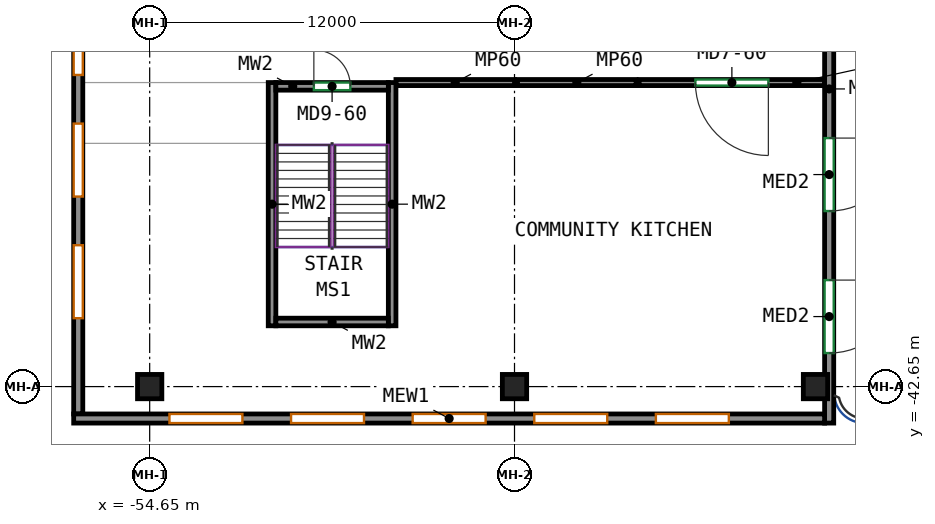
"""IFC4 building model, lengths in metres.
Left out: names, types, materials, properties, quantities, classifications, styles, units other than length and angle.
Written with IfcOpenShell. Run it as: python <this file> out.ifc"""

import sys

from ifc_helpers import new_model, si_unit, direction, frame, frame_2d, origin, origin_2d, place, context, subcontext, project, spatial, rectangle, extrude, source, transform, mapped, element, fill, save


model = new_model("IFC4")
c1 = context("Model", 3, precision=1e-05, world=origin(), true_north=direction((0.0, 1.0)))
c2 = subcontext(c1, "Body", "Model", "MODEL_VIEW")
j1 = project(units=[si_unit("LENGTHUNIT", "METRE"), si_unit("PLANEANGLEUNIT", "RADIAN")], contexts=[c1])
p1 = place(None, origin())
s1 = spatial("IfcSite", under=j1, at=p1, CompositionType="ELEMENT")
p2 = place(p1, origin())
s2 = spatial("IfcBuilding", under=s1, at=p2, CompositionType="ELEMENT")
p3 = place(p2, frame((0.0, 0.0, 13.5)))
s3 = spatial("IfcBuildingStorey", under=s2, at=p3, CompositionType="ELEMENT", Elevation=13.5)
m1 = source(origin(), c2, "Body", "SweptSolid", [
    extrude(rectangle(XDim=0.8, YDim=0.8, at=origin_2d()), origin(), (0.0, 0.0, 1.0), 4.1),
])
for number, where, z_axis, x_axis in (
    (1, (-54.65, -42.65, 0.0), (0.0, 0.0, 1.0), (1.0, 0.0, 0.0)),
    (2, (-42.65, -42.65, 0.0), (0.0, 0.0, 1.0), (1.0, 0.0, 0.0)),
    (3, (-32.75, -42.65, 0.0), (0.0, 0.0, 1.0), (1.0, 0.0, 0.0)),
):
    element("IfcColumn", number, at=place(p3, frame(where, z_axis=z_axis, x_axis=x_axis)), inside=s3, PredefinedType="COLUMN", context=c2, shape_type="MappedRepresentation", body=[
        mapped(m1, transform((0.0, 0.0, 0.0))),
    ])
m2 = source(origin(), c2, "Body", "SweptSolid", [
    extrude(rectangle(XDim=8.0, YDim=0.25, at=frame_2d((4.0, 0.0))), origin(), (0.0, 0.0, 1.0), 4.1),
])
for number, where, z_axis, x_axis in (
    (4, (-50.625, -40.65, 0.0), (0.0, 0.0, 1.0), (0.0, 1.0, 0.0)),
    (5, (-46.675, -40.65, 0.0), (0.0, 0.0, 1.0), (0.0, 1.0, 0.0)),
):
    element("IfcWall", number, at=place(p3, frame(where, z_axis=z_axis, x_axis=x_axis)), inside=s3, PredefinedType="SHEAR", context=c2, shape_type="MappedRepresentation", body=[
        mapped(m2, transform((0.0, 0.0, 0.0))),
    ])
m3 = source(origin(), c2, "Body", "SweptSolid", [
    extrude(rectangle(XDim=3.7, YDim=0.25, at=frame_2d((1.85, 0.0))), origin(), (0.0, 0.0, 1.0), 4.1),
])
p4 = place(p3, frame((-50.5, -40.525, 0.0), z_axis=(0.0, 0.0, 1.0), x_axis=(1.0, 0.0, 0.0)))
e6 = element("IfcWall", 6, at=p4, inside=s3, PredefinedType="SHEAR", context=c2, shape_type="MappedRepresentation", body=[
    mapped(m3, transform((0.0, 0.0, 0.0))),
])
p5 = place(p3, frame((-50.5, -32.775, 0.0), z_axis=(0.0, 0.0, 1.0), x_axis=(1.0, 0.0, 0.0)))
e7 = element("IfcWall", 7, at=p5, inside=s3, PredefinedType="SHEAR", context=c2, shape_type="MappedRepresentation", body=[
    mapped(m3, transform((0.0, 0.0, 0.0))),
])
p6 = place(p5, frame((1.25, 0.0, 0.0)))
e8 = element("IfcOpeningElement", 8, at=p6, cuts=e7, PredefinedType="OPENING", context=c2, shape_type="SweptSolid", body=[
    extrude(rectangle(XDim=1.2, YDim=2.1, at=frame_2d((0.6, 1.05))), frame((0.0, 0.135, 0.0), z_axis=(0.0, -1.0, 0.0), x_axis=(1.0, 0.0, 0.0)), (0.0, 0.0, 1.0), 0.27),
])
m4 = source(origin(), c2, "Body", "SweptSolid", [
    extrude(rectangle(XDim=100.7, YDim=0.3, at=frame_2d((50.35, 0.0))), origin(), (0.0, 0.0, 1.0), 4.1),
])
p7 = place(p3, frame((-57.0, -43.55, 0.0), z_axis=(0.0, 0.0, 1.0), x_axis=(0.0, 1.0, 0.0)))
e9 = element("IfcWall", 9, at=p7, inside=s3, PredefinedType="SOLIDWALL", context=c2, shape_type="MappedRepresentation", body=[
    mapped(m4, transform((0.0, 0.0, 0.0))),
])
p8 = place(p7, frame((3.15, 0.0, 0.9)))
e10 = element("IfcOpeningElement", 10, at=p8, cuts=e9, PredefinedType="OPENING", context=c2, shape_type="SweptSolid", body=[
    extrude(rectangle(XDim=2.4, YDim=1.8, at=frame_2d((1.2, 0.9))), frame((0.0, 0.16, 0.0), z_axis=(0.0, -1.0, 0.0), x_axis=(1.0, 0.0, 0.0)), (0.0, 0.0, 1.0), 0.32),
])
p9 = place(p7, frame((7.15, 0.0, 0.9)))
e11 = element("IfcOpeningElement", 11, at=p9, cuts=e9, PredefinedType="OPENING", context=c2, shape_type="SweptSolid", body=[
    extrude(rectangle(XDim=2.4, YDim=1.8, at=frame_2d((1.2, 0.9))), frame((0.0, 0.16, 0.0), z_axis=(0.0, -1.0, 0.0), x_axis=(1.0, 0.0, 0.0)), (0.0, 0.0, 1.0), 0.32),
])
p10 = place(p7, frame((11.15, 0.0, 0.9)))
e12 = element("IfcOpeningElement", 12, at=p10, cuts=e9, PredefinedType="OPENING", context=c2, shape_type="SweptSolid", body=[
    extrude(rectangle(XDim=2.4, YDim=1.8, at=frame_2d((1.2, 0.9))), frame((0.0, 0.16, 0.0), z_axis=(0.0, -1.0, 0.0), x_axis=(1.0, 0.0, 0.0)), (0.0, 0.0, 1.0), 0.32),
])
p11 = place(p7, frame((19.15, 0.0, 0.9)))
e13 = element("IfcOpeningElement", 13, at=p11, cuts=e9, PredefinedType="OPENING", context=c2, shape_type="SweptSolid", body=[
    extrude(rectangle(XDim=2.4, YDim=1.8, at=frame_2d((1.2, 0.9))), frame((0.0, 0.16, 0.0), z_axis=(0.0, -1.0, 0.0), x_axis=(1.0, 0.0, 0.0)), (0.0, 0.0, 1.0), 0.32),
])
p12 = place(p7, frame((23.15, 0.0, 0.9)))
e14 = element("IfcOpeningElement", 14, at=p12, cuts=e9, PredefinedType="OPENING", context=c2, shape_type="SweptSolid", body=[
    extrude(rectangle(XDim=2.4, YDim=1.8, at=frame_2d((1.2, 0.9))), frame((0.0, 0.16, 0.0), z_axis=(0.0, -1.0, 0.0), x_axis=(1.0, 0.0, 0.0)), (0.0, 0.0, 1.0), 0.32),
])
p13 = place(p7, frame((27.15, 0.0, 0.9)))
e15 = element("IfcOpeningElement", 15, at=p13, cuts=e9, PredefinedType="OPENING", context=c2, shape_type="SweptSolid", body=[
    extrude(rectangle(XDim=2.4, YDim=1.8, at=frame_2d((1.2, 0.9))), frame((0.0, 0.16, 0.0), z_axis=(0.0, -1.0, 0.0), x_axis=(1.0, 0.0, 0.0)), (0.0, 0.0, 1.0), 0.32),
])
p14 = place(p7, frame((31.15, 0.0, 0.9)))
e16 = element("IfcOpeningElement", 16, at=p14, cuts=e9, PredefinedType="OPENING", context=c2, shape_type="SweptSolid", body=[
    extrude(rectangle(XDim=2.4, YDim=1.8, at=frame_2d((1.2, 0.9))), frame((0.0, 0.16, 0.0), z_axis=(0.0, -1.0, 0.0), x_axis=(1.0, 0.0, 0.0)), (0.0, 0.0, 1.0), 0.32),
])
p15 = place(p7, frame((39.15, 0.0, 0.9)))
e17 = element("IfcOpeningElement", 17, at=p15, cuts=e9, PredefinedType="OPENING", context=c2, shape_type="SweptSolid", body=[
    extrude(rectangle(XDim=2.4, YDim=1.8, at=frame_2d((1.2, 0.9))), frame((0.0, 0.16, 0.0), z_axis=(0.0, -1.0, 0.0), x_axis=(1.0, 0.0, 0.0)), (0.0, 0.0, 1.0), 0.32),
])
p16 = place(p7, frame((43.15, 0.0, 0.9)))
e18 = element("IfcOpeningElement", 18, at=p16, cuts=e9, PredefinedType="OPENING", context=c2, shape_type="SweptSolid", body=[
    extrude(rectangle(XDim=2.4, YDim=1.8, at=frame_2d((1.2, 0.9))), frame((0.0, 0.16, 0.0), z_axis=(0.0, -1.0, 0.0), x_axis=(1.0, 0.0, 0.0)), (0.0, 0.0, 1.0), 0.32),
])
p17 = place(p7, frame((51.15, 0.0, 0.9)))
e19 = element("IfcOpeningElement", 19, at=p17, cuts=e9, PredefinedType="OPENING", context=c2, shape_type="SweptSolid", body=[
    extrude(rectangle(XDim=2.4, YDim=1.8, at=frame_2d((1.2, 0.9))), frame((0.0, 0.16, 0.0), z_axis=(0.0, -1.0, 0.0), x_axis=(1.0, 0.0, 0.0)), (0.0, 0.0, 1.0), 0.32),
])
p18 = place(p7, frame((55.15, 0.0, 0.9)))
e20 = element("IfcOpeningElement", 20, at=p18, cuts=e9, PredefinedType="OPENING", context=c2, shape_type="SweptSolid", body=[
    extrude(rectangle(XDim=2.4, YDim=1.8, at=frame_2d((1.2, 0.9))), frame((0.0, 0.16, 0.0), z_axis=(0.0, -1.0, 0.0), x_axis=(1.0, 0.0, 0.0)), (0.0, 0.0, 1.0), 0.32),
])
p19 = place(p7, frame((59.15, 0.0, 0.9)))
e21 = element("IfcOpeningElement", 21, at=p19, cuts=e9, PredefinedType="OPENING", context=c2, shape_type="SweptSolid", body=[
    extrude(rectangle(XDim=2.4, YDim=1.8, at=frame_2d((1.2, 0.9))), frame((0.0, 0.16, 0.0), z_axis=(0.0, -1.0, 0.0), x_axis=(1.0, 0.0, 0.0)), (0.0, 0.0, 1.0), 0.32),
])
p20 = place(p7, frame((63.15, 0.0, 0.9)))
e22 = element("IfcOpeningElement", 22, at=p20, cuts=e9, PredefinedType="OPENING", context=c2, shape_type="SweptSolid", body=[
    extrude(rectangle(XDim=2.4, YDim=1.8, at=frame_2d((1.2, 0.9))), frame((0.0, 0.16, 0.0), z_axis=(0.0, -1.0, 0.0), x_axis=(1.0, 0.0, 0.0)), (0.0, 0.0, 1.0), 0.32),
])
p21 = place(p7, frame((67.15, 0.0, 0.9)))
e23 = element("IfcOpeningElement", 23, at=p21, cuts=e9, PredefinedType="OPENING", context=c2, shape_type="SweptSolid", body=[
    extrude(rectangle(XDim=2.4, YDim=1.8, at=frame_2d((1.2, 0.9))), frame((0.0, 0.16, 0.0), z_axis=(0.0, -1.0, 0.0), x_axis=(1.0, 0.0, 0.0)), (0.0, 0.0, 1.0), 0.32),
])
p22 = place(p7, frame((75.15, 0.0, 0.9)))
e24 = element("IfcOpeningElement", 24, at=p22, cuts=e9, PredefinedType="OPENING", context=c2, shape_type="SweptSolid", body=[
    extrude(rectangle(XDim=2.4, YDim=1.8, at=frame_2d((1.2, 0.9))), frame((0.0, 0.16, 0.0), z_axis=(0.0, -1.0, 0.0), x_axis=(1.0, 0.0, 0.0)), (0.0, 0.0, 1.0), 0.32),
])
p23 = place(p7, frame((79.15, 0.0, 0.9)))
e25 = element("IfcOpeningElement", 25, at=p23, cuts=e9, PredefinedType="OPENING", context=c2, shape_type="SweptSolid", body=[
    extrude(rectangle(XDim=2.4, YDim=1.8, at=frame_2d((1.2, 0.9))), frame((0.0, 0.16, 0.0), z_axis=(0.0, -1.0, 0.0), x_axis=(1.0, 0.0, 0.0)), (0.0, 0.0, 1.0), 0.32),
])
p24 = place(p7, frame((83.15, 0.0, 0.9)))
e26 = element("IfcOpeningElement", 26, at=p24, cuts=e9, PredefinedType="OPENING", context=c2, shape_type="SweptSolid", body=[
    extrude(rectangle(XDim=2.4, YDim=1.8, at=frame_2d((1.2, 0.9))), frame((0.0, 0.16, 0.0), z_axis=(0.0, -1.0, 0.0), x_axis=(1.0, 0.0, 0.0)), (0.0, 0.0, 1.0), 0.32),
])
p25 = place(p7, frame((87.15, 0.0, 0.9)))
e27 = element("IfcOpeningElement", 27, at=p25, cuts=e9, PredefinedType="OPENING", context=c2, shape_type="SweptSolid", body=[
    extrude(rectangle(XDim=2.4, YDim=1.8, at=frame_2d((1.2, 0.9))), frame((0.0, 0.16, 0.0), z_axis=(0.0, -1.0, 0.0), x_axis=(1.0, 0.0, 0.0)), (0.0, 0.0, 1.0), 0.32),
])
p26 = place(p7, frame((91.15, 0.0, 0.9)))
e28 = element("IfcOpeningElement", 28, at=p26, cuts=e9, PredefinedType="OPENING", context=c2, shape_type="SweptSolid", body=[
    extrude(rectangle(XDim=2.4, YDim=1.8, at=frame_2d((1.2, 0.9))), frame((0.0, 0.16, 0.0), z_axis=(0.0, -1.0, 0.0), x_axis=(1.0, 0.0, 0.0)), (0.0, 0.0, 1.0), 0.32),
])
p27 = place(p7, frame((95.15, 0.0, 0.9)))
e29 = element("IfcOpeningElement", 29, at=p27, cuts=e9, PredefinedType="OPENING", context=c2, shape_type="SweptSolid", body=[
    extrude(rectangle(XDim=2.4, YDim=1.8, at=frame_2d((1.2, 0.9))), frame((0.0, 0.16, 0.0), z_axis=(0.0, -1.0, 0.0), x_axis=(1.0, 0.0, 0.0)), (0.0, 0.0, 1.0), 0.32),
])
m5 = source(origin(), c2, "Body", "SweptSolid", [
    extrude(rectangle(XDim=15.7, YDim=0.3, at=frame_2d((7.85, 0.0))), origin(), (0.0, 0.0, 1.0), 4.1),
])
p28 = place(p3, frame((-32.3, -28.15, 0.0), z_axis=(0.0, 0.0, 1.0), x_axis=(0.0, -1.0, 0.0)))
e30 = element("IfcWall", 30, at=p28, inside=s3, PredefinedType="SOLIDWALL", context=c2, shape_type="MappedRepresentation", body=[
    mapped(m5, transform((0.0, 0.0, 0.0))),
])
p29 = place(p28, frame((6.326, 0.0, 0.0)))
e31 = element("IfcOpeningElement", 31, at=p29, cuts=e30, PredefinedType="OPENING", context=c2, shape_type="SweptSolid", body=[
    extrude(rectangle(XDim=2.4, YDim=2.4, at=frame_2d((1.2, 1.2))), frame((0.0, 0.16, 0.0), z_axis=(0.0, -1.0, 0.0), x_axis=(1.0, 0.0, 0.0)), (0.0, 0.0, 1.0), 0.32),
])
p30 = place(p28, frame((10.997, 0.0, 0.0)))
e32 = element("IfcOpeningElement", 32, at=p30, cuts=e30, PredefinedType="OPENING", context=c2, shape_type="SweptSolid", body=[
    extrude(rectangle(XDim=2.4, YDim=2.4, at=frame_2d((1.2, 1.2))), frame((0.0, 0.16, 0.0), z_axis=(0.0, -1.0, 0.0), x_axis=(1.0, 0.0, 0.0)), (0.0, 0.0, 1.0), 0.32),
])
m6 = source(origin(), c2, "Body", "SweptSolid", [
    extrude(rectangle(XDim=24.7, YDim=0.3, at=frame_2d((12.35, 0.0))), origin(), (0.0, 0.0, 1.0), 4.1),
])
p31 = place(p3, frame((-32.45, -43.7, 0.0), z_axis=(0.0, 0.0, 1.0), x_axis=(-1.0, 0.0, 0.0)))
e33 = element("IfcWall", 33, at=p31, inside=s3, PredefinedType="SOLIDWALL", context=c2, shape_type="MappedRepresentation", body=[
    mapped(m6, transform((0.0, 0.0, 0.0))),
])
p32 = place(p31, frame((3.15, 0.0, 0.9)))
e34 = element("IfcOpeningElement", 34, at=p32, cuts=e33, PredefinedType="OPENING", context=c2, shape_type="SweptSolid", body=[
    extrude(rectangle(XDim=2.4, YDim=1.8, at=frame_2d((1.2, 0.9))), frame((0.0, 0.16, 0.0), z_axis=(0.0, -1.0, 0.0), x_axis=(1.0, 0.0, 0.0)), (0.0, 0.0, 1.0), 0.32),
])
p33 = place(p31, frame((7.15, 0.0, 0.9)))
e35 = element("IfcOpeningElement", 35, at=p33, cuts=e33, PredefinedType="OPENING", context=c2, shape_type="SweptSolid", body=[
    extrude(rectangle(XDim=2.4, YDim=1.8, at=frame_2d((1.2, 0.9))), frame((0.0, 0.16, 0.0), z_axis=(0.0, -1.0, 0.0), x_axis=(1.0, 0.0, 0.0)), (0.0, 0.0, 1.0), 0.32),
])
p34 = place(p31, frame((11.15, 0.0, 0.9)))
e36 = element("IfcOpeningElement", 36, at=p34, cuts=e33, PredefinedType="OPENING", context=c2, shape_type="SweptSolid", body=[
    extrude(rectangle(XDim=2.4, YDim=1.8, at=frame_2d((1.2, 0.9))), frame((0.0, 0.16, 0.0), z_axis=(0.0, -1.0, 0.0), x_axis=(1.0, 0.0, 0.0)), (0.0, 0.0, 1.0), 0.32),
])
p35 = place(p31, frame((15.15, 0.0, 0.9)))
e37 = element("IfcOpeningElement", 37, at=p35, cuts=e33, PredefinedType="OPENING", context=c2, shape_type="SweptSolid", body=[
    extrude(rectangle(XDim=2.4, YDim=1.8, at=frame_2d((1.2, 0.9))), frame((0.0, 0.16, 0.0), z_axis=(0.0, -1.0, 0.0), x_axis=(1.0, 0.0, 0.0)), (0.0, 0.0, 1.0), 0.32),
])
p36 = place(p31, frame((19.15, 0.0, 0.9)))
e38 = element("IfcOpeningElement", 38, at=p36, cuts=e33, PredefinedType="OPENING", context=c2, shape_type="SweptSolid", body=[
    extrude(rectangle(XDim=2.4, YDim=1.8, at=frame_2d((1.2, 0.9))), frame((0.0, 0.16, 0.0), z_axis=(0.0, -1.0, 0.0), x_axis=(1.0, 0.0, 0.0)), (0.0, 0.0, 1.0), 0.32),
])
m7 = source(origin(), c2, "Body", "SweptSolid", [
    extrude(rectangle(XDim=3.9, YDim=0.2, at=frame_2d((1.95, 0.0))), origin(), (0.0, 0.0, 1.0), 3.3),
])
for number, where, z_axis, x_axis in (
    (39, (-42.65, -32.65, 0.0), (0.0, 0.0, 1.0), (-1.0, 0.0, 0.0)),
    (40, (-38.65, -32.65, 0.0), (0.0, 0.0, 1.0), (-1.0, 0.0, 0.0)),
):
    element("IfcWall", number, at=place(p3, frame(where, z_axis=z_axis, x_axis=x_axis)), inside=s3, PredefinedType="PARTITIONING", context=c2, shape_type="MappedRepresentation", body=[
        mapped(m7, transform((0.0, 0.0, 0.0))),
    ])
m8 = source(origin(), c2, "Body", "SweptSolid", [
    extrude(rectangle(XDim=6.1, YDim=0.2, at=frame_2d((3.05, 0.0))), origin(), (0.0, 0.0, 1.0), 3.5),
])
p37 = place(p3, frame((-32.45, -32.65, 0.0), z_axis=(0.0, 0.0, 1.0), x_axis=(-1.0, 0.0, 0.0)))
e41 = element("IfcWall", 41, at=p37, inside=s3, PredefinedType="PARTITIONING", context=c2, shape_type="MappedRepresentation", body=[
    mapped(m8, transform((0.0, 0.0, 0.0))),
])
p38 = place(p37, frame((1.85, 0.0, 0.0)))
e42 = element("IfcOpeningElement", 42, at=p38, cuts=e41, PredefinedType="OPENING", context=c2, shape_type="SweptSolid", body=[
    extrude(rectangle(XDim=2.4, YDim=2.4, at=frame_2d((1.2, 1.2))), frame((0.0, 0.11, 0.0), z_axis=(0.0, -1.0, 0.0), x_axis=(1.0, 0.0, 0.0)), (0.0, 0.0, 1.0), 0.22),
])
p39 = place(p29, origin())
e43 = element("IfcDoor", 43, at=p39, inside=s3, OperationType="DOUBLE_DOOR_SINGLE_SWING", PredefinedType="DOOR", context=c2, shape_type="SweptSolid", body=[
    extrude(rectangle(XDim=2.4, YDim=2.4, at=frame_2d((1.2, 1.2))), frame((0.0, 0.025, 0.0), z_axis=(0.0, -1.0, 0.0), x_axis=(1.0, 0.0, 0.0)), (0.0, 0.0, 1.0), 0.05),
])
fill(e31, e43)
p40 = place(p30, origin())
e44 = element("IfcDoor", 44, at=p40, inside=s3, OperationType="DOUBLE_DOOR_SINGLE_SWING", PredefinedType="DOOR", context=c2, shape_type="SweptSolid", body=[
    extrude(rectangle(XDim=2.4, YDim=2.4, at=frame_2d((1.2, 1.2))), frame((0.0, 0.025, 0.0), z_axis=(0.0, -1.0, 0.0), x_axis=(1.0, 0.0, 0.0)), (0.0, 0.0, 1.0), 0.05),
])
fill(e32, e44)
p41 = place(p8, origin())
e45 = element("IfcWindow", 45, at=p41, inside=s3, PartitioningType="SINGLE_PANEL", PredefinedType="WINDOW", context=c2, shape_type="SweptSolid", body=[
    extrude(rectangle(XDim=2.4, YDim=1.8, at=frame_2d((1.2, 0.9))), frame((0.0, 0.03, 0.0), z_axis=(0.0, -1.0, 0.0), x_axis=(1.0, 0.0, 0.0)), (0.0, 0.0, 1.0), 0.06),
])
fill(e10, e45)
p42 = place(p9, origin())
e46 = element("IfcWindow", 46, at=p42, inside=s3, PartitioningType="SINGLE_PANEL", PredefinedType="WINDOW", context=c2, shape_type="SweptSolid", body=[
    extrude(rectangle(XDim=2.4, YDim=1.8, at=frame_2d((1.2, 0.9))), frame((0.0, 0.03, 0.0), z_axis=(0.0, -1.0, 0.0), x_axis=(1.0, 0.0, 0.0)), (0.0, 0.0, 1.0), 0.06),
])
fill(e11, e46)
p43 = place(p10, origin())
e47 = element("IfcWindow", 47, at=p43, inside=s3, PartitioningType="SINGLE_PANEL", PredefinedType="WINDOW", context=c2, shape_type="SweptSolid", body=[
    extrude(rectangle(XDim=2.4, YDim=1.8, at=frame_2d((1.2, 0.9))), frame((0.0, 0.03, 0.0), z_axis=(0.0, -1.0, 0.0), x_axis=(1.0, 0.0, 0.0)), (0.0, 0.0, 1.0), 0.06),
])
fill(e12, e47)
p44 = place(p32, origin())
e48 = element("IfcWindow", 48, at=p44, inside=s3, PartitioningType="SINGLE_PANEL", PredefinedType="WINDOW", context=c2, shape_type="SweptSolid", body=[
    extrude(rectangle(XDim=2.4, YDim=1.8, at=frame_2d((1.2, 0.9))), frame((0.0, 0.03, 0.0), z_axis=(0.0, -1.0, 0.0), x_axis=(1.0, 0.0, 0.0)), (0.0, 0.0, 1.0), 0.06),
])
fill(e34, e48)
p45 = place(p33, origin())
e49 = element("IfcWindow", 49, at=p45, inside=s3, PartitioningType="SINGLE_PANEL", PredefinedType="WINDOW", context=c2, shape_type="SweptSolid", body=[
    extrude(rectangle(XDim=2.4, YDim=1.8, at=frame_2d((1.2, 0.9))), frame((0.0, 0.03, 0.0), z_axis=(0.0, -1.0, 0.0), x_axis=(1.0, 0.0, 0.0)), (0.0, 0.0, 1.0), 0.06),
])
fill(e35, e49)
p46 = place(p34, origin())
e50 = element("IfcWindow", 50, at=p46, inside=s3, PartitioningType="SINGLE_PANEL", PredefinedType="WINDOW", context=c2, shape_type="SweptSolid", body=[
    extrude(rectangle(XDim=2.4, YDim=1.8, at=frame_2d((1.2, 0.9))), frame((0.0, 0.03, 0.0), z_axis=(0.0, -1.0, 0.0), x_axis=(1.0, 0.0, 0.0)), (0.0, 0.0, 1.0), 0.06),
])
fill(e36, e50)
p47 = place(p35, origin())
e51 = element("IfcWindow", 51, at=p47, inside=s3, PartitioningType="SINGLE_PANEL", PredefinedType="WINDOW", context=c2, shape_type="SweptSolid", body=[
    extrude(rectangle(XDim=2.4, YDim=1.8, at=frame_2d((1.2, 0.9))), frame((0.0, 0.03, 0.0), z_axis=(0.0, -1.0, 0.0), x_axis=(1.0, 0.0, 0.0)), (0.0, 0.0, 1.0), 0.06),
])
fill(e37, e51)
p48 = place(p36, origin())
e52 = element("IfcWindow", 52, at=p48, inside=s3, PartitioningType="SINGLE_PANEL", PredefinedType="WINDOW", context=c2, shape_type="SweptSolid", body=[
    extrude(rectangle(XDim=2.4, YDim=1.8, at=frame_2d((1.2, 0.9))), frame((0.0, 0.03, 0.0), z_axis=(0.0, -1.0, 0.0), x_axis=(1.0, 0.0, 0.0)), (0.0, 0.0, 1.0), 0.06),
])
fill(e38, e52)
p49 = place(p6, origin())
e53 = element("IfcDoor", 53, at=p49, inside=s3, OperationType="DOUBLE_DOOR_SINGLE_SWING", PredefinedType="DOOR", context=c2, shape_type="SweptSolid", body=[
    extrude(rectangle(XDim=1.2, YDim=2.1, at=frame_2d((0.6, 1.05))), frame((0.0, 0.025, 0.0), z_axis=(0.0, -1.0, 0.0), x_axis=(1.0, 0.0, 0.0)), (0.0, 0.0, 1.0), 0.05),
])
fill(e8, e53)
p50 = place(p38, origin())
e54 = element("IfcDoor", 54, at=p50, inside=s3, OperationType="DOUBLE_DOOR_SINGLE_SWING", PredefinedType="DOOR", context=c2, shape_type="SweptSolid", body=[
    extrude(rectangle(XDim=2.4, YDim=2.4, at=frame_2d((1.2, 1.2))), frame((0.0, 0.025, 0.0), z_axis=(0.0, -1.0, 0.0), x_axis=(1.0, 0.0, 0.0)), (0.0, 0.0, 1.0), 0.05),
])
fill(e42, e54)
save(model, sys.argv[1])
